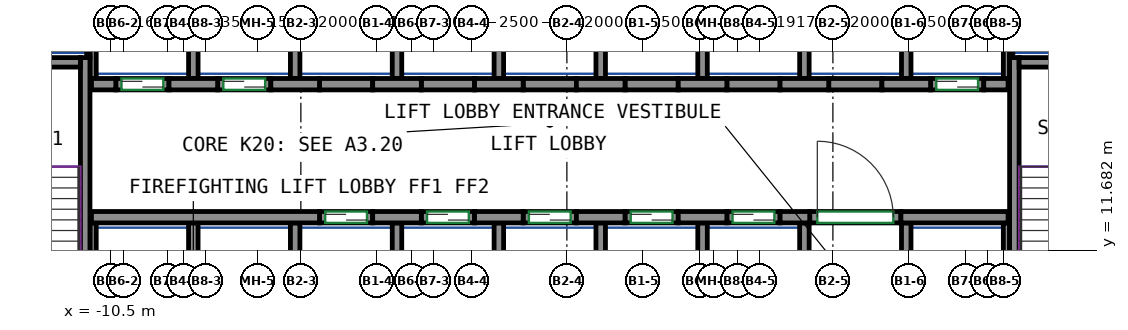
"""IFC4 building model, lengths in metres.
Left out: names, types, materials, properties, quantities, classifications, styles, units other than length and angle.
Written with IfcOpenShell. Run it as: python <this file> out.ifc"""

import sys

from ifc_helpers import new_model, si_unit, direction, frame, frame_2d, origin, place, context, subcontext, project, spatial, rectangle, extrude, source, transform, mapped, element, fill, save


model = new_model("IFC4")
c1 = context("Model", 3, precision=1e-05, world=origin(), true_north=direction((0.0, 1.0)))
c2 = subcontext(c1, "Body", "Model", "MODEL_VIEW")
j1 = project(units=[si_unit("LENGTHUNIT", "METRE"), si_unit("PLANEANGLEUNIT", "RADIAN")], contexts=[c1])
p1 = place(None, origin())
s1 = spatial("IfcSite", under=j1, at=p1, CompositionType="ELEMENT")
p2 = place(p1, origin())
s2 = spatial("IfcBuilding", under=s1, at=p2, CompositionType="ELEMENT")
p3 = place(p2, frame((0.0, 0.0, 83.2)))
s3 = spatial("IfcBuildingStorey", under=s2, at=p3, CompositionType="ELEMENT", Elevation=83.2)
m1 = source(origin(), c2, "Body", "SweptSolid", [
    extrude(rectangle(XDim=7.75, YDim=0.25, at=frame_2d((3.875, 0.0))), origin(), (0.0, 0.0, 1.0), 3.72),
])
p4 = place(p3, frame((-11.175, 9.0, 0.0), z_axis=(0.0, 0.0, 1.0), x_axis=(0.0, 1.0, 0.0)))
e1 = element("IfcWall", 1, at=p4, inside=s3, PredefinedType="SHEAR", context=c2, shape_type="MappedRepresentation", body=[
    mapped(m1, transform((0.0, 0.0, 0.0))),
])
m2 = source(origin(), c2, "Body", "SweptSolid", [
    extrude(rectangle(XDim=3.7, YDim=0.25, at=frame_2d((1.85, 0.0))), origin(), (0.0, 0.0, 1.0), 3.72),
])
p5 = place(p3, frame((-15.0, 16.625, 0.0), z_axis=(0.0, 0.0, 1.0), x_axis=(1.0, 0.0, 0.0)))
e2 = element("IfcWall", 2, at=p5, inside=s3, PredefinedType="SHEAR", context=c2, shape_type="MappedRepresentation", body=[
    mapped(m2, transform((0.0, 0.0, 0.0))),
])
p6 = place(p3, frame((13.275, 9.0, 0.0), z_axis=(0.0, 0.0, 1.0), x_axis=(0.0, 1.0, 0.0)))
e3 = element("IfcWall", 3, at=p6, inside=s3, PredefinedType="SHEAR", context=c2, shape_type="MappedRepresentation", body=[
    mapped(m1, transform((0.0, 0.0, 0.0))),
])
m3 = source(origin(), c2, "Body", "SweptSolid", [
    extrude(rectangle(XDim=3.7, YDim=0.25, at=frame_2d((1.85, 0.0))), origin(), (0.0, 0.0, 1.0), 3.72),
])
p7 = place(p3, frame((13.4, 16.625, 0.0), z_axis=(0.0, 0.0, 1.0), x_axis=(1.0, 0.0, 0.0)))
e4 = element("IfcWall", 4, at=p7, inside=s3, PredefinedType="SHEAR", context=c2, shape_type="MappedRepresentation", body=[
    mapped(m3, transform((0.0, 0.0, 0.0))),
])
m4 = source(origin(), c2, "Body", "SweptSolid", [
    extrude(rectangle(XDim=6.0, YDim=0.3, at=frame_2d((3.0, 0.0))), origin(), (0.0, 0.0, 1.0), 3.72),
])
p8 = place(p3, frame((-11.01, 12.55, 0.0), z_axis=(0.0, 0.0, 1.0), x_axis=(1.0, 0.0, 0.0)))
e5 = element("IfcWall", 5, at=p8, inside=s3, PredefinedType="SHEAR", context=c2, shape_type="MappedRepresentation", body=[
    mapped(m4, transform((0.0, 0.0, 0.0))),
])
m5 = source(origin(), c2, "Body", "SweptSolid", [
    extrude(rectangle(XDim=1.28, YDim=0.3, at=frame_2d((0.64, 0.0))), origin(), (0.0, 0.0, 1.0), 3.72),
])
for number, where, z_axis, x_axis in (
    (6, (-3.61, 12.55, 0.0), (0.0, 0.0, 1.0), (1.0, 0.0, 0.0)),
    (7, (-0.93, 12.55, 0.0), (0.0, 0.0, 1.0), (1.0, 0.0, 0.0)),
    (8, (1.75, 12.55, 0.0), (0.0, 0.0, 1.0), (1.0, 0.0, 0.0)),
    (9, (4.43, 12.55, 0.0), (0.0, 0.0, 1.0), (1.0, 0.0, 0.0)),
):
    element("IfcWall", number, at=place(p3, frame(where, z_axis=z_axis, x_axis=x_axis)), inside=s3, PredefinedType="SHEAR", context=c2, shape_type="MappedRepresentation", body=[
        mapped(m5, transform((0.0, 0.0, 0.0))),
    ])
m6 = source(origin(), c2, "Body", "SweptSolid", [
    extrude(rectangle(XDim=0.78, YDim=0.3, at=frame_2d((0.39, 0.0))), origin(), (0.0, 0.0, 1.0), 3.72),
])
p9 = place(p3, frame((7.11, 12.55, 0.0), z_axis=(0.0, 0.0, 1.0), x_axis=(1.0, 0.0, 0.0)))
e10 = element("IfcWall", 10, at=p9, inside=s3, PredefinedType="SHEAR", context=c2, shape_type="MappedRepresentation", body=[
    mapped(m6, transform((0.0, 0.0, 0.0))),
])
m7 = source(origin(), c2, "Body", "SweptSolid", [
    extrude(rectangle(XDim=2.82, YDim=0.3, at=frame_2d((1.41, 0.0))), origin(), (0.0, 0.0, 1.0), 3.72),
])
p10 = place(p3, frame((10.29, 12.55, 0.0), z_axis=(0.0, 0.0, 1.0), x_axis=(1.0, 0.0, 0.0)))
e11 = element("IfcWall", 11, at=p10, inside=s3, PredefinedType="SHEAR", context=c2, shape_type="MappedRepresentation", body=[
    mapped(m7, transform((0.0, 0.0, 0.0))),
])
m8 = source(origin(), c2, "Body", "SweptSolid", [
    extrude(rectangle(XDim=0.64, YDim=0.3, at=frame_2d((0.32, 0.0))), origin(), (0.0, 0.0, 1.0), 3.72),
])
p11 = place(p3, frame((-11.01, 16.05, 0.0), z_axis=(0.0, 0.0, 1.0), x_axis=(1.0, 0.0, 0.0)))
e12 = element("IfcWall", 12, at=p11, inside=s3, PredefinedType="SHEAR", context=c2, shape_type="MappedRepresentation", body=[
    mapped(m8, transform((0.0, 0.0, 0.0))),
])
for number, where, z_axis, x_axis in (
    (13, (-8.97, 16.05, 0.0), (0.0, 0.0, 1.0), (1.0, 0.0, 0.0)),
    (14, (-6.29, 16.05, 0.0), (0.0, 0.0, 1.0), (1.0, 0.0, 0.0)),
    (15, (-3.61, 16.05, 0.0), (0.0, 0.0, 1.0), (1.0, 0.0, 0.0)),
    (16, (-0.93, 16.05, 0.0), (0.0, 0.0, 1.0), (1.0, 0.0, 0.0)),
    (17, (1.75, 16.05, 0.0), (0.0, 0.0, 1.0), (1.0, 0.0, 0.0)),
    (18, (4.43, 16.05, 0.0), (0.0, 0.0, 1.0), (1.0, 0.0, 0.0)),
):
    element("IfcWall", number, at=place(p3, frame(where, z_axis=z_axis, x_axis=x_axis)), inside=s3, PredefinedType="SHEAR", context=c2, shape_type="MappedRepresentation", body=[
        mapped(m5, transform((0.0, 0.0, 0.0))),
    ])
m9 = source(origin(), c2, "Body", "SweptSolid", [
    extrude(rectangle(XDim=1.28, YDim=0.3, at=frame_2d((0.64, 0.0))), origin(), (0.0, 0.0, 1.0), 3.72),
])
p12 = place(p3, frame((7.11, 16.05, 0.0), z_axis=(0.0, 0.0, 1.0), x_axis=(1.0, 0.0, 0.0)))
e19 = element("IfcWall", 19, at=p12, inside=s3, PredefinedType="SHEAR", context=c2, shape_type="MappedRepresentation", body=[
    mapped(m9, transform((0.0, 0.0, 0.0))),
])
p13 = place(p3, frame((9.79, 16.05, 0.0), z_axis=(0.0, 0.0, 1.0), x_axis=(1.0, 0.0, 0.0)))
e20 = element("IfcWall", 20, at=p13, inside=s3, PredefinedType="SHEAR", context=c2, shape_type="MappedRepresentation", body=[
    mapped(m5, transform((0.0, 0.0, 0.0))),
])
m10 = source(origin(), c2, "Body", "SweptSolid", [
    extrude(rectangle(XDim=0.64, YDim=0.3, at=frame_2d((0.32, 0.0))), origin(), (0.0, 0.0, 1.0), 3.72),
])
p14 = place(p3, frame((12.47, 16.05, 0.0), z_axis=(0.0, 0.0, 1.0), x_axis=(1.0, 0.0, 0.0)))
e21 = element("IfcWall", 21, at=p14, inside=s3, PredefinedType="SHEAR", context=c2, shape_type="MappedRepresentation", body=[
    mapped(m10, transform((0.0, 0.0, 0.0))),
])
m11 = source(origin(), c2, "Body", "SweptSolid", [
    extrude(rectangle(XDim=1.4, YDim=0.3, at=frame_2d((0.7, 0.0))), origin(), (0.0, 0.0, 1.0), 3.72),
])
p15 = place(p3, frame((-5.01, 12.55, 0.0), z_axis=(0.0, 0.0, 1.0), x_axis=(1.0, 0.0, 0.0)))
e22 = element("IfcWall", 22, at=p15, inside=s3, PredefinedType="PARTITIONING", context=c2, shape_type="MappedRepresentation", body=[
    mapped(m11, transform((0.0, 0.0, 0.0))),
])
p16 = place(p15, frame((0.15, 0.0, 0.0)))
e23 = element("IfcOpeningElement", 23, at=p16, cuts=e22, PredefinedType="OPENING", context=c2, shape_type="SweptSolid", body=[
    extrude(rectangle(XDim=1.1, YDim=2.1, at=frame_2d((0.55, 1.05))), frame((0.0, 0.16, 0.0), z_axis=(0.0, -1.0, 0.0), x_axis=(1.0, 0.0, 0.0)), (0.0, 0.0, 1.0), 0.32),
])
m12 = source(origin(), c2, "Body", "SweptSolid", [
    extrude(rectangle(XDim=1.4, YDim=0.3, at=frame_2d((0.7, 0.0))), origin(), (0.0, 0.0, 1.0), 3.72),
])
p17 = place(p3, frame((-2.33, 12.55, 0.0), z_axis=(0.0, 0.0, 1.0), x_axis=(1.0, 0.0, 0.0)))
e24 = element("IfcWall", 24, at=p17, inside=s3, PredefinedType="PARTITIONING", context=c2, shape_type="MappedRepresentation", body=[
    mapped(m12, transform((0.0, 0.0, 0.0))),
])
p18 = place(p17, frame((0.15, 0.0, 0.0)))
e25 = element("IfcOpeningElement", 25, at=p18, cuts=e24, PredefinedType="OPENING", context=c2, shape_type="SweptSolid", body=[
    extrude(rectangle(XDim=1.1, YDim=2.1, at=frame_2d((0.55, 1.05))), frame((0.0, 0.16, 0.0), z_axis=(0.0, -1.0, 0.0), x_axis=(1.0, 0.0, 0.0)), (0.0, 0.0, 1.0), 0.32),
])
p19 = place(p3, frame((0.35, 12.55, 0.0), z_axis=(0.0, 0.0, 1.0), x_axis=(1.0, 0.0, 0.0)))
e26 = element("IfcWall", 26, at=p19, inside=s3, PredefinedType="PARTITIONING", context=c2, shape_type="MappedRepresentation", body=[
    mapped(m11, transform((0.0, 0.0, 0.0))),
])
p20 = place(p19, frame((0.15, 0.0, 0.0)))
e27 = element("IfcOpeningElement", 27, at=p20, cuts=e26, PredefinedType="OPENING", context=c2, shape_type="SweptSolid", body=[
    extrude(rectangle(XDim=1.1, YDim=2.1, at=frame_2d((0.55, 1.05))), frame((0.0, 0.16, 0.0), z_axis=(0.0, -1.0, 0.0), x_axis=(1.0, 0.0, 0.0)), (0.0, 0.0, 1.0), 0.32),
])
p21 = place(p3, frame((3.03, 12.55, 0.0), z_axis=(0.0, 0.0, 1.0), x_axis=(1.0, 0.0, 0.0)))
e28 = element("IfcWall", 28, at=p21, inside=s3, PredefinedType="PARTITIONING", context=c2, shape_type="MappedRepresentation", body=[
    mapped(m11, transform((0.0, 0.0, 0.0))),
])
p22 = place(p21, frame((0.15, 0.0, 0.0)))
e29 = element("IfcOpeningElement", 29, at=p22, cuts=e28, PredefinedType="OPENING", context=c2, shape_type="SweptSolid", body=[
    extrude(rectangle(XDim=1.1, YDim=2.1, at=frame_2d((0.55, 1.05))), frame((0.0, 0.16, 0.0), z_axis=(0.0, -1.0, 0.0), x_axis=(1.0, 0.0, 0.0)), (0.0, 0.0, 1.0), 0.32),
])
p23 = place(p3, frame((5.71, 12.55, 0.0), z_axis=(0.0, 0.0, 1.0), x_axis=(1.0, 0.0, 0.0)))
e30 = element("IfcWall", 30, at=p23, inside=s3, PredefinedType="PARTITIONING", context=c2, shape_type="MappedRepresentation", body=[
    mapped(m12, transform((0.0, 0.0, 0.0))),
])
p24 = place(p23, frame((0.15, 0.0, 0.0)))
e31 = element("IfcOpeningElement", 31, at=p24, cuts=e30, PredefinedType="OPENING", context=c2, shape_type="SweptSolid", body=[
    extrude(rectangle(XDim=1.1, YDim=2.1, at=frame_2d((0.55, 1.05))), frame((0.0, 0.16, 0.0), z_axis=(0.0, -1.0, 0.0), x_axis=(1.0, 0.0, 0.0)), (0.0, 0.0, 1.0), 0.32),
])
p25 = place(p3, frame((11.07, 16.05, 0.0), z_axis=(0.0, 0.0, 1.0), x_axis=(1.0, 0.0, 0.0)))
e32 = element("IfcWall", 32, at=p25, inside=s3, PredefinedType="PARTITIONING", context=c2, shape_type="MappedRepresentation", body=[
    mapped(m11, transform((0.0, 0.0, 0.0))),
])
p26 = place(p25, frame((0.15, 0.0, 0.0)))
e33 = element("IfcOpeningElement", 33, at=p26, cuts=e32, PredefinedType="OPENING", context=c2, shape_type="SweptSolid", body=[
    extrude(rectangle(XDim=1.1, YDim=2.1, at=frame_2d((0.55, 1.05))), frame((0.0, 0.16, 0.0), z_axis=(0.0, -1.0, 0.0), x_axis=(1.0, 0.0, 0.0)), (0.0, 0.0, 1.0), 0.32),
])
p27 = place(p3, frame((-10.37, 16.05, 0.0), z_axis=(0.0, 0.0, 1.0), x_axis=(1.0, 0.0, 0.0)))
e34 = element("IfcWall", 34, at=p27, inside=s3, PredefinedType="PARTITIONING", context=c2, shape_type="MappedRepresentation", body=[
    mapped(m12, transform((0.0, 0.0, 0.0))),
])
p28 = place(p27, frame((0.15, 0.0, 0.0)))
e35 = element("IfcOpeningElement", 35, at=p28, cuts=e34, PredefinedType="OPENING", context=c2, shape_type="SweptSolid", body=[
    extrude(rectangle(XDim=1.1, YDim=2.1, at=frame_2d((0.55, 1.05))), frame((0.0, 0.16, 0.0), z_axis=(0.0, -1.0, 0.0), x_axis=(1.0, 0.0, 0.0)), (0.0, 0.0, 1.0), 0.32),
])
p29 = place(p3, frame((-7.69, 16.05, 0.0), z_axis=(0.0, 0.0, 1.0), x_axis=(1.0, 0.0, 0.0)))
e36 = element("IfcWall", 36, at=p29, inside=s3, PredefinedType="PARTITIONING", context=c2, shape_type="MappedRepresentation", body=[
    mapped(m11, transform((0.0, 0.0, 0.0))),
])
p30 = place(p29, frame((0.15, 0.0, 0.0)))
e37 = element("IfcOpeningElement", 37, at=p30, cuts=e36, PredefinedType="OPENING", context=c2, shape_type="SweptSolid", body=[
    extrude(rectangle(XDim=1.1, YDim=2.1, at=frame_2d((0.55, 1.05))), frame((0.0, 0.16, 0.0), z_axis=(0.0, -1.0, 0.0), x_axis=(1.0, 0.0, 0.0)), (0.0, 0.0, 1.0), 0.32),
])
m13 = source(origin(), c2, "Body", "SweptSolid", [
    extrude(rectangle(XDim=2.4, YDim=0.3, at=frame_2d((1.2, 0.0))), origin(), (0.0, 0.0, 1.0), 3.72),
])
p31 = place(p3, frame((7.89, 12.55, 0.0), z_axis=(0.0, 0.0, 1.0), x_axis=(1.0, 0.0, 0.0)))
e38 = element("IfcWall", 38, at=p31, inside=s3, PredefinedType="PARTITIONING", context=c2, shape_type="MappedRepresentation", body=[
    mapped(m13, transform((0.0, 0.0, 0.0))),
])
p32 = place(p31, frame((0.2, 0.0, 0.0)))
e39 = element("IfcOpeningElement", 39, at=p32, cuts=e38, PredefinedType="OPENING", context=c2, shape_type="SweptSolid", body=[
    extrude(rectangle(XDim=2.0, YDim=2.1, at=frame_2d((1.0, 1.05))), frame((0.0, 0.16, 0.0), z_axis=(0.0, -1.0, 0.0), x_axis=(1.0, 0.0, 0.0)), (0.0, 0.0, 1.0), 0.32),
])
p33 = place(p3, frame((-5.01, 16.05, 0.0), z_axis=(0.0, 0.0, 1.0), x_axis=(1.0, 0.0, 0.0)))
e40 = element("IfcWall", 40, at=p33, inside=s3, PredefinedType="PARTITIONING", context=c2, shape_type="MappedRepresentation", body=[
    mapped(m11, transform((0.0, 0.0, 0.0))),
])
p34 = place(p3, frame((-2.33, 16.05, 0.0), z_axis=(0.0, 0.0, 1.0), x_axis=(1.0, 0.0, 0.0)))
e41 = element("IfcWall", 41, at=p34, inside=s3, PredefinedType="PARTITIONING", context=c2, shape_type="MappedRepresentation", body=[
    mapped(m12, transform((0.0, 0.0, 0.0))),
])
for number, where, z_axis, x_axis in (
    (42, (0.35, 16.05, 0.0), (0.0, 0.0, 1.0), (1.0, 0.0, 0.0)),
    (43, (3.03, 16.05, 0.0), (0.0, 0.0, 1.0), (1.0, 0.0, 0.0)),
):
    element("IfcWall", number, at=place(p3, frame(where, z_axis=z_axis, x_axis=x_axis)), inside=s3, PredefinedType="PARTITIONING", context=c2, shape_type="MappedRepresentation", body=[
        mapped(m11, transform((0.0, 0.0, 0.0))),
    ])
for number, where, z_axis, x_axis in (
    (44, (5.71, 16.05, 0.0), (0.0, 0.0, 1.0), (1.0, 0.0, 0.0)),
    (45, (8.39, 16.05, 0.0), (0.0, 0.0, 1.0), (1.0, 0.0, 0.0)),
):
    element("IfcWall", number, at=place(p3, frame(where, z_axis=z_axis, x_axis=x_axis)), inside=s3, PredefinedType="PARTITIONING", context=c2, shape_type="MappedRepresentation", body=[
        mapped(m12, transform((0.0, 0.0, 0.0))),
    ])
m14 = source(origin(), c2, "Body", "SweptSolid", [
    extrude(rectangle(XDim=3.275, YDim=0.165, at=frame_2d((1.638, 0.0))), origin(), (0.0, 0.0, 1.0), 3.72),
])
for number, where, z_axis, x_axis in (
    (46, (13.067, 16.2, 0.0), (0.0, 0.0, 1.0), (0.0, 1.0, 0.0)),
    (47, (-10.968, 16.2, 0.0), (0.0, 0.0, 1.0), (0.0, 1.0, 0.0)),
):
    element("IfcWall", number, at=place(p3, frame(where, z_axis=z_axis, x_axis=x_axis)), inside=s3, PredefinedType="PARTITIONING", context=c2, shape_type="MappedRepresentation", body=[
        mapped(m14, transform((0.0, 0.0, 0.0))),
    ])
m15 = source(origin(), c2, "Body", "SweptSolid", [
    extrude(rectangle(XDim=3.275, YDim=0.25, at=frame_2d((1.638, 0.0))), origin(), (0.0, 0.0, 1.0), 3.72),
])
p35 = place(p3, frame((10.43, 16.2, 0.0), z_axis=(0.0, 0.0, 1.0), x_axis=(0.0, 1.0, 0.0)))
e48 = element("IfcWall", 48, at=p35, inside=s3, PredefinedType="PARTITIONING", context=c2, shape_type="MappedRepresentation", body=[
    mapped(m15, transform((0.0, 0.0, 0.0))),
])
m16 = source(origin(), c2, "Body", "SweptSolid", [
    extrude(rectangle(XDim=2.725, YDim=0.085, at=frame_2d((1.363, 0.0))), origin(), (0.0, 0.0, 1.0), 3.72),
])
p36 = place(p3, frame((13.192, 16.75, 0.0), z_axis=(0.0, 0.0, 1.0), x_axis=(0.0, 1.0, 0.0)))
e49 = element("IfcWall", 49, at=p36, inside=s3, PredefinedType="PARTITIONING", context=c2, shape_type="MappedRepresentation", body=[
    mapped(m16, transform((0.0, 0.0, 0.0))),
])
for number, where, z_axis, x_axis in (
    (50, (2.39, 16.2, 0.0), (0.0, 0.0, 1.0), (0.0, 1.0, 0.0)),
    (51, (5.07, 16.2, 0.0), (0.0, 0.0, 1.0), (0.0, 1.0, 0.0)),
    (52, (7.75, 16.2, 0.0), (0.0, 0.0, 1.0), (0.0, 1.0, 0.0)),
    (53, (-0.29, 16.2, 0.0), (0.0, 0.0, 1.0), (0.0, 1.0, 0.0)),
):
    element("IfcWall", number, at=place(p3, frame(where, z_axis=z_axis, x_axis=x_axis)), inside=s3, PredefinedType="PARTITIONING", context=c2, shape_type="MappedRepresentation", body=[
        mapped(m15, transform((0.0, 0.0, 0.0))),
    ])
p37 = place(p3, frame((-11.093, 16.75, 0.0), z_axis=(0.0, 0.0, 1.0), x_axis=(0.0, 1.0, 0.0)))
e54 = element("IfcWall", 54, at=p37, inside=s3, PredefinedType="PARTITIONING", context=c2, shape_type="MappedRepresentation", body=[
    mapped(m16, transform((0.0, 0.0, 0.0))),
])
for number, where, z_axis, x_axis in (
    (55, (-2.97, 16.2, 0.0), (0.0, 0.0, 1.0), (0.0, 1.0, 0.0)),
    (56, (-5.65, 16.2, 0.0), (0.0, 0.0, 1.0), (0.0, 1.0, 0.0)),
    (57, (-8.33, 16.2, 0.0), (0.0, 0.0, 1.0), (0.0, 1.0, 0.0)),
):
    element("IfcWall", number, at=place(p3, frame(where, z_axis=z_axis, x_axis=x_axis)), inside=s3, PredefinedType="PARTITIONING", context=c2, shape_type="MappedRepresentation", body=[
        mapped(m15, transform((0.0, 0.0, 0.0))),
    ])
m17 = source(origin(), c2, "Body", "SweptSolid", [
    extrude(rectangle(XDim=3.4, YDim=0.25, at=frame_2d((1.7, 0.0))), origin(), (0.0, 0.0, 1.0), 3.72),
])
p38 = place(p3, frame((10.43, 9.0, 0.0), z_axis=(0.0, 0.0, 1.0), x_axis=(0.0, 1.0, 0.0)))
e58 = element("IfcWall", 58, at=p38, inside=s3, PredefinedType="PARTITIONING", context=c2, shape_type="MappedRepresentation", body=[
    mapped(m17, transform((0.0, 0.0, 0.0))),
])
m18 = source(origin(), c2, "Body", "SweptSolid", [
    extrude(rectangle(XDim=3.4, YDim=0.165, at=frame_2d((1.7, 0.0))), origin(), (0.0, 0.0, 1.0), 3.72),
])
p39 = place(p3, frame((13.067, 9.0, 0.0), z_axis=(0.0, 0.0, 1.0), x_axis=(0.0, 1.0, 0.0)))
e59 = element("IfcWall", 59, at=p39, inside=s3, PredefinedType="PARTITIONING", context=c2, shape_type="MappedRepresentation", body=[
    mapped(m18, transform((0.0, 0.0, 0.0))),
])
for number, where, z_axis, x_axis in (
    (60, (2.39, 9.0, 0.0), (0.0, 0.0, 1.0), (0.0, 1.0, 0.0)),
    (61, (5.07, 9.0, 0.0), (0.0, 0.0, 1.0), (0.0, 1.0, 0.0)),
    (62, (7.75, 9.0, 0.0), (0.0, 0.0, 1.0), (0.0, 1.0, 0.0)),
    (63, (-0.29, 9.0, 0.0), (0.0, 0.0, 1.0), (0.0, 1.0, 0.0)),
):
    element("IfcWall", number, at=place(p3, frame(where, z_axis=z_axis, x_axis=x_axis)), inside=s3, PredefinedType="PARTITIONING", context=c2, shape_type="MappedRepresentation", body=[
        mapped(m17, transform((0.0, 0.0, 0.0))),
    ])
p40 = place(p3, frame((-10.968, 9.0, 0.0), z_axis=(0.0, 0.0, 1.0), x_axis=(0.0, 1.0, 0.0)))
e64 = element("IfcWall", 64, at=p40, inside=s3, PredefinedType="PARTITIONING", context=c2, shape_type="MappedRepresentation", body=[
    mapped(m18, transform((0.0, 0.0, 0.0))),
])
for number, where, z_axis, x_axis in (
    (65, (-2.97, 9.0, 0.0), (0.0, 0.0, 1.0), (0.0, 1.0, 0.0)),
    (66, (-5.65, 9.0, 0.0), (0.0, 0.0, 1.0), (0.0, 1.0, 0.0)),
    (67, (-8.33, 9.0, 0.0), (0.0, 0.0, 1.0), (0.0, 1.0, 0.0)),
):
    element("IfcWall", number, at=place(p3, frame(where, z_axis=z_axis, x_axis=x_axis)), inside=s3, PredefinedType="PARTITIONING", context=c2, shape_type="MappedRepresentation", body=[
        mapped(m17, transform((0.0, 0.0, 0.0))),
    ])
p41 = place(p32, origin())
e68 = element("IfcDoor", 68, at=p41, inside=s3, OperationType="DOUBLE_DOOR_SINGLE_SWING", PredefinedType="DOOR", context=c2, shape_type="SweptSolid", body=[
    extrude(rectangle(XDim=2.0, YDim=2.1, at=frame_2d((1.0, 1.05))), frame((0.0, 0.025, 0.0), z_axis=(0.0, -1.0, 0.0), x_axis=(1.0, 0.0, 0.0)), (0.0, 0.0, 1.0), 0.05),
])
fill(e39, e68)
p42 = place(p16, origin())
e69 = element("IfcDoor", 69, at=p42, inside=s3, OperationType="DOUBLE_DOOR_SLIDING", PredefinedType="DOOR", context=c2, shape_type="SweptSolid", body=[
    extrude(rectangle(XDim=1.1, YDim=2.1, at=frame_2d((0.55, 1.05))), frame((0.0, 0.025, 0.0), z_axis=(0.0, -1.0, 0.0), x_axis=(1.0, 0.0, 0.0)), (0.0, 0.0, 1.0), 0.05),
])
fill(e23, e69)
p43 = place(p18, origin())
e70 = element("IfcDoor", 70, at=p43, inside=s3, OperationType="DOUBLE_DOOR_SLIDING", PredefinedType="DOOR", context=c2, shape_type="SweptSolid", body=[
    extrude(rectangle(XDim=1.1, YDim=2.1, at=frame_2d((0.55, 1.05))), frame((0.0, 0.025, 0.0), z_axis=(0.0, -1.0, 0.0), x_axis=(1.0, 0.0, 0.0)), (0.0, 0.0, 1.0), 0.05),
])
fill(e25, e70)
p44 = place(p20, origin())
e71 = element("IfcDoor", 71, at=p44, inside=s3, OperationType="DOUBLE_DOOR_SLIDING", PredefinedType="DOOR", context=c2, shape_type="SweptSolid", body=[
    extrude(rectangle(XDim=1.1, YDim=2.1, at=frame_2d((0.55, 1.05))), frame((0.0, 0.025, 0.0), z_axis=(0.0, -1.0, 0.0), x_axis=(1.0, 0.0, 0.0)), (0.0, 0.0, 1.0), 0.05),
])
fill(e27, e71)
p45 = place(p22, origin())
e72 = element("IfcDoor", 72, at=p45, inside=s3, OperationType="DOUBLE_DOOR_SLIDING", PredefinedType="DOOR", context=c2, shape_type="SweptSolid", body=[
    extrude(rectangle(XDim=1.1, YDim=2.1, at=frame_2d((0.55, 1.05))), frame((0.0, 0.025, 0.0), z_axis=(0.0, -1.0, 0.0), x_axis=(1.0, 0.0, 0.0)), (0.0, 0.0, 1.0), 0.05),
])
fill(e29, e72)
p46 = place(p24, origin())
e73 = element("IfcDoor", 73, at=p46, inside=s3, OperationType="DOUBLE_DOOR_SLIDING", PredefinedType="DOOR", context=c2, shape_type="SweptSolid", body=[
    extrude(rectangle(XDim=1.1, YDim=2.1, at=frame_2d((0.55, 1.05))), frame((0.0, 0.025, 0.0), z_axis=(0.0, -1.0, 0.0), x_axis=(1.0, 0.0, 0.0)), (0.0, 0.0, 1.0), 0.05),
])
fill(e31, e73)
p47 = place(p26, origin())
e74 = element("IfcDoor", 74, at=p47, inside=s3, OperationType="DOUBLE_DOOR_SLIDING", PredefinedType="DOOR", context=c2, shape_type="SweptSolid", body=[
    extrude(rectangle(XDim=1.1, YDim=2.1, at=frame_2d((0.55, 1.05))), frame((0.0, 0.025, 0.0), z_axis=(0.0, -1.0, 0.0), x_axis=(1.0, 0.0, 0.0)), (0.0, 0.0, 1.0), 0.05),
])
fill(e33, e74)
p48 = place(p28, origin())
e75 = element("IfcDoor", 75, at=p48, inside=s3, OperationType="DOUBLE_DOOR_SLIDING", PredefinedType="DOOR", context=c2, shape_type="SweptSolid", body=[
    extrude(rectangle(XDim=1.1, YDim=2.1, at=frame_2d((0.55, 1.05))), frame((0.0, 0.025, 0.0), z_axis=(0.0, -1.0, 0.0), x_axis=(1.0, 0.0, 0.0)), (0.0, 0.0, 1.0), 0.05),
])
fill(e35, e75)
p49 = place(p30, origin())
e76 = element("IfcDoor", 76, at=p49, inside=s3, OperationType="DOUBLE_DOOR_SLIDING", PredefinedType="DOOR", context=c2, shape_type="SweptSolid", body=[
    extrude(rectangle(XDim=1.1, YDim=2.1, at=frame_2d((0.55, 1.05))), frame((0.0, 0.025, 0.0), z_axis=(0.0, -1.0, 0.0), x_axis=(1.0, 0.0, 0.0)), (0.0, 0.0, 1.0), 0.05),
])
fill(e37, e76)
save(model, sys.argv[1])
